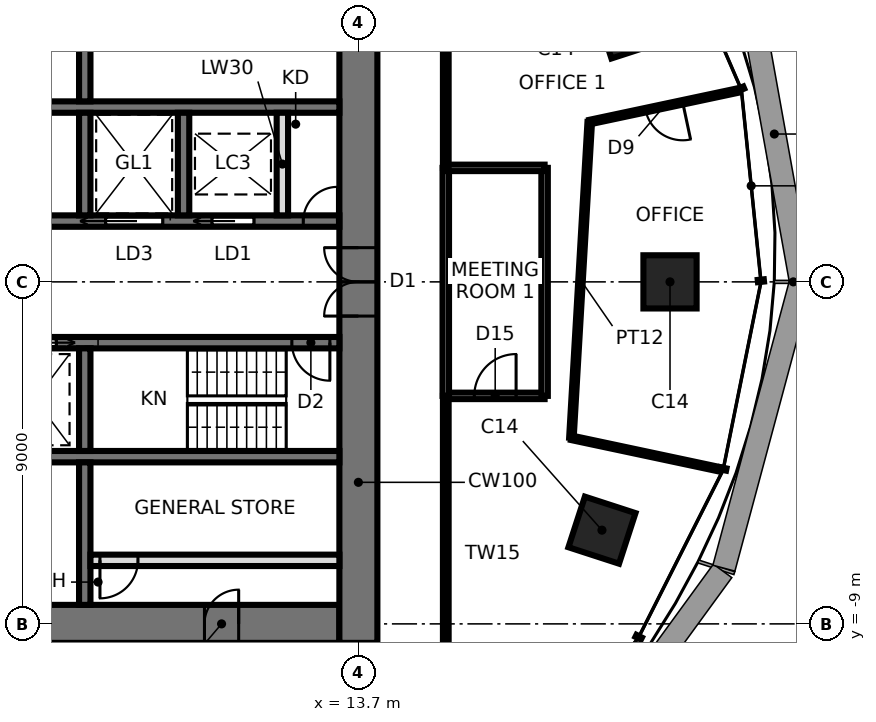
"""IFC4 building model, lengths in metres.
Left out: names, types, materials, properties, quantities, classifications, styles, units other than length and angle.
Written with IfcOpenShell. Run it as: python <this file> out.ifc"""

import sys

from ifc_helpers import new_model, si_unit, direction, frame, frame_2d, origin, origin_2d, place, context, subcontext, project, spatial, rectangle, extrude, element, fill, save


model = new_model("IFC4")
c1 = context("Model", 3, precision=1e-05, world=origin(), true_north=direction((0.0, 1.0)))
c2 = subcontext(c1, "Body", "Model", "MODEL_VIEW")
j1 = project(units=[si_unit("LENGTHUNIT", "METRE"), si_unit("PLANEANGLEUNIT", "RADIAN")], contexts=[c1])
p1 = place(None, origin())
s1 = spatial("IfcSite", under=j1, at=p1, CompositionType="ELEMENT")
p2 = place(p1, origin())
s2 = spatial("IfcBuilding", under=s1, at=p2, CompositionType="ELEMENT")
p3 = place(p2, frame((0.0, 0.0, 195.5)))
s3 = spatial("IfcBuildingStorey", under=s2, at=p3, CompositionType="ELEMENT", Elevation=195.5)
for number, where, z_axis, x_axis in (
    (1, (21.9, 0.0, 0.0), (0.0, 0.0, 1.0), (1.0, 0.0, 0.0)),
    (2, (20.808, 6.761, 0.0), (0.0, 0.0, 1.0), (0.951, 0.309, 0.0)),
    (3, (20.109, -6.534, 0.0), (0.0, 0.0, 1.0), (0.951, -0.309, 0.0)),
):
    element("IfcColumn", number, at=place(p3, frame(where, z_axis=z_axis, x_axis=x_axis)), inside=s3, PredefinedType="COLUMN", context=c2, shape_type="SweptSolid", body=[
        extrude(rectangle(XDim=1.4, YDim=1.4, at=origin_2d()), origin(), (0.0, 0.0, 1.0), 3.9),
    ])
p4 = place(p3, frame((-13.2, -9.0, 0.0), z_axis=(0.0, 0.0, 1.0), x_axis=(1.0, 0.0, 0.0)))
e4 = element("IfcWall", 4, at=p4, inside=s3, PredefinedType="SHEAR", context=c2, shape_type="SweptSolid", body=[
    extrude(rectangle(XDim=26.4, YDim=1.0, at=frame_2d((13.2, 0.0))), origin(), (0.0, 0.0, 1.0), 3.9),
])
p5 = place(p4, frame((2.65, 0.0, 0.0)))
e5 = element("IfcOpeningElement", 5, at=p5, cuts=e4, PredefinedType="OPENING", context=c2, shape_type="SweptSolid", body=[
    extrude(rectangle(XDim=0.9, YDim=2.1, at=frame_2d((0.45, 1.05))), frame((0.0, 0.51, 0.0), z_axis=(0.0, -1.0, 0.0), x_axis=(1.0, 0.0, 0.0)), (0.0, 0.0, 1.0), 1.02),
])
p6 = place(p4, frame((9.5, 0.0, 0.0)))
e6 = element("IfcOpeningElement", 6, at=p6, cuts=e4, PredefinedType="OPENING", context=c2, shape_type="SweptSolid", body=[
    extrude(rectangle(XDim=0.9, YDim=2.1, at=frame_2d((0.45, 1.05))), frame((0.0, 0.51, 0.0), z_axis=(0.0, -1.0, 0.0), x_axis=(1.0, 0.0, 0.0)), (0.0, 0.0, 1.0), 1.02),
])
p7 = place(p4, frame((16.0, 0.0, 0.0)))
e7 = element("IfcOpeningElement", 7, at=p7, cuts=e4, PredefinedType="OPENING", context=c2, shape_type="SweptSolid", body=[
    extrude(rectangle(XDim=0.9, YDim=2.1, at=frame_2d((0.45, 1.05))), frame((0.0, 0.51, 0.0), z_axis=(0.0, -1.0, 0.0), x_axis=(1.0, 0.0, 0.0)), (0.0, 0.0, 1.0), 1.02),
])
p8 = place(p4, frame((22.85, 0.0, 0.0)))
e8 = element("IfcOpeningElement", 8, at=p8, cuts=e4, PredefinedType="OPENING", context=c2, shape_type="SweptSolid", body=[
    extrude(rectangle(XDim=0.9, YDim=2.1, at=frame_2d((0.45, 1.05))), frame((0.0, 0.51, 0.0), z_axis=(0.0, -1.0, 0.0), x_axis=(1.0, 0.0, 0.0)), (0.0, 0.0, 1.0), 1.02),
])
p9 = place(p3, frame((13.7, -9.5, 0.0), z_axis=(0.0, 0.0, 1.0), x_axis=(0.0, 1.0, 0.0)))
e9 = element("IfcWall", 9, at=p9, inside=s3, PredefinedType="SHEAR", context=c2, shape_type="SweptSolid", body=[
    extrude(rectangle(XDim=19.0, YDim=1.0, at=frame_2d((9.5, 0.0))), origin(), (0.0, 0.0, 1.0), 3.9),
])
p10 = place(p9, frame((8.6, 0.0, 0.0)))
e10 = element("IfcOpeningElement", 10, at=p10, cuts=e9, PredefinedType="OPENING", context=c2, shape_type="SweptSolid", body=[
    extrude(rectangle(XDim=1.8, YDim=2.4, at=frame_2d((0.9, 1.2))), frame((0.0, 0.51, 0.0), z_axis=(0.0, -1.0, 0.0), x_axis=(1.0, 0.0, 0.0)), (0.0, 0.0, 1.0), 1.02),
])
p11 = place(p3, frame((-13.2, 1.6, 0.0), z_axis=(0.0, 0.0, 1.0), x_axis=(1.0, 0.0, 0.0)))
e11 = element("IfcWall", 11, at=p11, inside=s3, PredefinedType="SHEAR", context=c2, shape_type="SweptSolid", body=[
    extrude(rectangle(XDim=26.4, YDim=0.3, at=frame_2d((13.2, 0.0))), origin(), (0.0, 0.0, 1.0), 3.9),
])
p12 = place(p11, frame((0.25, 0.0, 0.0)))
e12 = element("IfcOpeningElement", 12, at=p12, cuts=e11, PredefinedType="OPENING", context=c2, shape_type="SweptSolid", body=[
    extrude(rectangle(XDim=1.0, YDim=2.1, at=frame_2d((0.5, 1.05))), frame((0.0, 0.16, 0.0), z_axis=(0.0, -1.0, 0.0), x_axis=(1.0, 0.0, 0.0)), (0.0, 0.0, 1.0), 0.32),
])
p13 = place(p11, frame((23.05, 0.0, 0.0)))
e13 = element("IfcOpeningElement", 13, at=p13, cuts=e11, PredefinedType="OPENING", context=c2, shape_type="SweptSolid", body=[
    extrude(rectangle(XDim=1.1, YDim=2.3, at=frame_2d((0.55, 1.15))), frame((0.0, 0.16, 0.0), z_axis=(0.0, -1.0, 0.0), x_axis=(1.0, 0.0, 0.0)), (0.0, 0.0, 1.0), 0.32),
])
p14 = place(p11, frame((20.25, 0.0, 0.0)))
e14 = element("IfcOpeningElement", 14, at=p14, cuts=e11, PredefinedType="OPENING", context=c2, shape_type="SweptSolid", body=[
    extrude(rectangle(XDim=1.5, YDim=2.4, at=frame_2d((0.75, 1.2))), frame((0.0, 0.16, 0.0), z_axis=(0.0, -1.0, 0.0), x_axis=(1.0, 0.0, 0.0)), (0.0, 0.0, 1.0), 0.32),
])
p15 = place(p11, frame((7.55, 0.0, 0.0)))
e15 = element("IfcOpeningElement", 15, at=p15, cuts=e11, PredefinedType="OPENING", context=c2, shape_type="SweptSolid", body=[
    extrude(rectangle(XDim=0.9, YDim=2.1, at=frame_2d((0.45, 1.05))), frame((0.0, 0.16, 0.0), z_axis=(0.0, -1.0, 0.0), x_axis=(1.0, 0.0, 0.0)), (0.0, 0.0, 1.0), 0.32),
])
p16 = place(p11, frame((10.15, 0.0, 0.0)))
e16 = element("IfcOpeningElement", 16, at=p16, cuts=e11, PredefinedType="OPENING", context=c2, shape_type="SweptSolid", body=[
    extrude(rectangle(XDim=0.9, YDim=2.1, at=frame_2d((0.45, 1.05))), frame((0.0, 0.16, 0.0), z_axis=(0.0, -1.0, 0.0), x_axis=(1.0, 0.0, 0.0)), (0.0, 0.0, 1.0), 0.32),
])
p17 = place(p11, frame((12.75, 0.0, 0.0)))
e17 = element("IfcOpeningElement", 17, at=p17, cuts=e11, PredefinedType="OPENING", context=c2, shape_type="SweptSolid", body=[
    extrude(rectangle(XDim=0.9, YDim=2.1, at=frame_2d((0.45, 1.05))), frame((0.0, 0.16, 0.0), z_axis=(0.0, -1.0, 0.0), x_axis=(1.0, 0.0, 0.0)), (0.0, 0.0, 1.0), 0.32),
])
p18 = place(p11, frame((25.45, 0.0, 0.0)))
e18 = element("IfcOpeningElement", 18, at=p18, cuts=e11, PredefinedType="OPENING", context=c2, shape_type="SweptSolid", body=[
    extrude(rectangle(XDim=0.9, YDim=2.1, at=frame_2d((0.45, 1.05))), frame((0.0, 0.16, 0.0), z_axis=(0.0, -1.0, 0.0), x_axis=(1.0, 0.0, 0.0)), (0.0, 0.0, 1.0), 0.32),
])
p19 = place(p3, frame((-13.2, -1.6, 0.0), z_axis=(0.0, 0.0, 1.0), x_axis=(1.0, 0.0, 0.0)))
e19 = element("IfcWall", 19, at=p19, inside=s3, PredefinedType="SHEAR", context=c2, shape_type="SweptSolid", body=[
    extrude(rectangle(XDim=26.4, YDim=0.3, at=frame_2d((13.2, 0.0))), origin(), (0.0, 0.0, 1.0), 3.9),
])
p20 = place(p19, frame((25.15, 0.0, 0.0)))
e20 = element("IfcOpeningElement", 20, at=p20, cuts=e19, PredefinedType="OPENING", context=c2, shape_type="SweptSolid", body=[
    extrude(rectangle(XDim=1.0, YDim=2.1, at=frame_2d((0.5, 1.05))), frame((0.0, 0.16, 0.0), z_axis=(0.0, -1.0, 0.0), x_axis=(1.0, 0.0, 0.0)), (0.0, 0.0, 1.0), 0.32),
])
p21 = place(p19, frame((7.55, 0.0, 0.0)))
e21 = element("IfcOpeningElement", 21, at=p21, cuts=e19, PredefinedType="OPENING", context=c2, shape_type="SweptSolid", body=[
    extrude(rectangle(XDim=0.9, YDim=2.1, at=frame_2d((0.45, 1.05))), frame((0.0, 0.16, 0.0), z_axis=(0.0, -1.0, 0.0), x_axis=(1.0, 0.0, 0.0)), (0.0, 0.0, 1.0), 0.32),
])
p22 = place(p19, frame((10.15, 0.0, 0.0)))
e22 = element("IfcOpeningElement", 22, at=p22, cuts=e19, PredefinedType="OPENING", context=c2, shape_type="SweptSolid", body=[
    extrude(rectangle(XDim=0.9, YDim=2.1, at=frame_2d((0.45, 1.05))), frame((0.0, 0.16, 0.0), z_axis=(0.0, -1.0, 0.0), x_axis=(1.0, 0.0, 0.0)), (0.0, 0.0, 1.0), 0.32),
])
p23 = place(p19, frame((12.75, 0.0, 0.0)))
e23 = element("IfcOpeningElement", 23, at=p23, cuts=e19, PredefinedType="OPENING", context=c2, shape_type="SweptSolid", body=[
    extrude(rectangle(XDim=0.9, YDim=2.1, at=frame_2d((0.45, 1.05))), frame((0.0, 0.16, 0.0), z_axis=(0.0, -1.0, 0.0), x_axis=(1.0, 0.0, 0.0)), (0.0, 0.0, 1.0), 0.32),
])
p24 = place(p19, frame((15.25, 0.0, 0.0)))
e24 = element("IfcOpeningElement", 24, at=p24, cuts=e19, PredefinedType="OPENING", context=c2, shape_type="SweptSolid", body=[
    extrude(rectangle(XDim=1.1, YDim=2.3, at=frame_2d((0.55, 1.15))), frame((0.0, 0.16, 0.0), z_axis=(0.0, -1.0, 0.0), x_axis=(1.0, 0.0, 0.0)), (0.0, 0.0, 1.0), 0.32),
])
p25 = place(p19, frame((17.85, 0.0, 0.0)))
e25 = element("IfcOpeningElement", 25, at=p25, cuts=e19, PredefinedType="OPENING", context=c2, shape_type="SweptSolid", body=[
    extrude(rectangle(XDim=1.1, YDim=2.3, at=frame_2d((0.55, 1.15))), frame((0.0, 0.16, 0.0), z_axis=(0.0, -1.0, 0.0), x_axis=(1.0, 0.0, 0.0)), (0.0, 0.0, 1.0), 0.32),
])
p26 = place(p19, frame((4.85, 0.0, 0.0)))
e26 = element("IfcOpeningElement", 26, at=p26, cuts=e19, PredefinedType="OPENING", context=c2, shape_type="SweptSolid", body=[
    extrude(rectangle(XDim=1.1, YDim=2.3, at=frame_2d((0.55, 1.15))), frame((0.0, 0.16, 0.0), z_axis=(0.0, -1.0, 0.0), x_axis=(1.0, 0.0, 0.0)), (0.0, 0.0, 1.0), 0.32),
])
p27 = place(p19, frame((2.25, 0.0, 0.0)))
e27 = element("IfcOpeningElement", 27, at=p27, cuts=e19, PredefinedType="OPENING", context=c2, shape_type="SweptSolid", body=[
    extrude(rectangle(XDim=1.1, YDim=2.3, at=frame_2d((0.55, 1.15))), frame((0.0, 0.16, 0.0), z_axis=(0.0, -1.0, 0.0), x_axis=(1.0, 0.0, 0.0)), (0.0, 0.0, 1.0), 0.32),
])
p28 = place(p19, frame((0.35, 0.0, 0.0)))
e28 = element("IfcOpeningElement", 28, at=p28, cuts=e19, PredefinedType="OPENING", context=c2, shape_type="SweptSolid", body=[
    extrude(rectangle(XDim=0.9, YDim=2.1, at=frame_2d((0.45, 1.05))), frame((0.0, 0.16, 0.0), z_axis=(0.0, -1.0, 0.0), x_axis=(1.0, 0.0, 0.0)), (0.0, 0.0, 1.0), 0.32),
])
for number, where, z_axis, x_axis in (
    (29, (-13.2, 4.6, 0.0), (0.0, 0.0, 1.0), (1.0, 0.0, 0.0)),
    (30, (-13.2, -4.6, 0.0), (0.0, 0.0, 1.0), (1.0, 0.0, 0.0)),
):
    element("IfcWall", number, at=place(p3, frame(where, z_axis=z_axis, x_axis=x_axis)), inside=s3, PredefinedType="SHEAR", context=c2, shape_type="SweptSolid", body=[
        extrude(rectangle(XDim=26.4, YDim=0.3, at=frame_2d((13.2, 0.0))), origin(), (0.0, 0.0, 1.0), 3.9),
    ])
p29 = place(p3, frame((6.5, 1.75, 0.0), z_axis=(0.0, 0.0, 1.0), x_axis=(0.0, 1.0, 0.0)))
e31 = element("IfcWall", 31, at=p29, inside=s3, PredefinedType="SHEAR", context=c2, shape_type="SweptSolid", body=[
    extrude(rectangle(XDim=2.7, YDim=0.3, at=frame_2d((1.35, 0.0))), origin(), (0.0, 0.0, 1.0), 3.9),
])
p30 = place(p3, frame((6.5, 4.75, 0.0), z_axis=(0.0, 0.0, 1.0), x_axis=(0.0, 1.0, 0.0)))
e32 = element("IfcWall", 32, at=p30, inside=s3, PredefinedType="SHEAR", context=c2, shape_type="SweptSolid", body=[
    extrude(rectangle(XDim=3.75, YDim=0.3, at=frame_2d((1.875, 0.0))), origin(), (0.0, 0.0, 1.0), 3.9),
])
p31 = place(p3, frame((6.5, -1.75, 0.0), z_axis=(0.0, 0.0, 1.0), x_axis=(0.0, -1.0, 0.0)))
e33 = element("IfcWall", 33, at=p31, inside=s3, PredefinedType="SHEAR", context=c2, shape_type="SweptSolid", body=[
    extrude(rectangle(XDim=2.7, YDim=0.3, at=frame_2d((1.35, 0.0))), origin(), (0.0, 0.0, 1.0), 3.9),
])
p32 = place(p3, frame((6.5, -4.75, 0.0), z_axis=(0.0, 0.0, 1.0), x_axis=(0.0, -1.0, 0.0)))
e34 = element("IfcWall", 34, at=p32, inside=s3, PredefinedType="SHEAR", context=c2, shape_type="SweptSolid", body=[
    extrude(rectangle(XDim=3.75, YDim=0.3, at=frame_2d((1.875, 0.0))), origin(), (0.0, 0.0, 1.0), 3.9),
])
p33 = place(p3, frame((9.1, 1.75, 0.0), z_axis=(0.0, 0.0, 1.0), x_axis=(0.0, 1.0, 0.0)))
e35 = element("IfcWall", 35, at=p33, inside=s3, PredefinedType="SHEAR", context=c2, shape_type="SweptSolid", body=[
    extrude(rectangle(XDim=2.7, YDim=0.3, at=frame_2d((1.35, 0.0))), origin(), (0.0, 0.0, 1.0), 3.9),
])
p34 = place(p3, frame((6.65, -7.328, 0.0), z_axis=(0.0, 0.0, 1.0), x_axis=(1.0, 0.0, 0.0)))
e36 = element("IfcWall", 36, at=p34, inside=s3, PredefinedType="PARTITIONING", context=c2, shape_type="SweptSolid", body=[
    extrude(rectangle(XDim=6.55, YDim=0.3, at=frame_2d((3.275, 0.0))), origin(), (0.0, 0.0, 1.0), 3.74),
])
p35 = place(p34, frame((0.25, 0.0, 0.0)))
e37 = element("IfcOpeningElement", 37, at=p35, cuts=e36, PredefinedType="OPENING", context=c2, shape_type="SweptSolid", body=[
    extrude(rectangle(XDim=1.0, YDim=2.4, at=frame_2d((0.5, 1.2))), frame((0.0, 0.16, 0.0), z_axis=(0.0, -1.0, 0.0), x_axis=(1.0, 0.0, 0.0)), (0.0, 0.0, 1.0), 0.32),
])
p36 = place(p3, frame((11.7, 1.75, 0.0), z_axis=(0.0, 0.0, 1.0), x_axis=(0.0, 1.0, 0.0)))
e38 = element("IfcWall", 38, at=p36, inside=s3, PredefinedType="SOLIDWALL", context=c2, shape_type="SweptSolid", body=[
    extrude(rectangle(XDim=2.7, YDim=0.3, at=frame_2d((1.35, 0.0))), origin(), (0.0, 0.0, 1.0), 3.74),
])
p37 = place(p3, frame((16.0, -11.3, 0.0), z_axis=(0.0, 0.0, 1.0), x_axis=(0.0, 1.0, 0.0)))
e39 = element("IfcWall", 39, at=p37, inside=s3, PredefinedType="PARTITIONING", context=c2, shape_type="SweptSolid", body=[
    extrude(rectangle(XDim=8.3, YDim=0.15, at=frame_2d((4.15, 0.0))), origin(), (0.0, 0.0, 1.0), 3.74),
])
p38 = place(p3, frame((19.306, -4.104, 0.0), z_axis=(0.0, 0.0, 1.0), x_axis=(0.978137903693, -0.207957306576, 0.0)))
e40 = element("IfcWall", 40, at=p38, inside=s3, PredefinedType="PARTITIONING", context=c2, shape_type="SweptSolid", body=[
    extrude(rectangle(XDim=4.0, YDim=0.12, at=frame_2d((2.0, 0.0))), origin(), (0.0, 0.0, 1.0), 3.74),
])
p39 = place(p3, frame((16.0, -3.0, 0.0), z_axis=(0.0, 0.0, 1.0), x_axis=(1.0, 0.0, 0.0)))
e41 = element("IfcWall", 41, at=p39, inside=s3, PredefinedType="PARTITIONING", context=c2, shape_type="SweptSolid", body=[
    extrude(rectangle(XDim=2.6, YDim=0.17, at=frame_2d((1.3, 0.0))), origin(), (0.0, 0.0, 1.0), 3.74),
])
p40 = place(p39, frame((0.75, 0.0, 0.0)))
e42 = element("IfcOpeningElement", 42, at=p40, cuts=e41, PredefinedType="OPENING", context=c2, shape_type="SweptSolid", body=[
    extrude(rectangle(XDim=1.1, YDim=2.4, at=frame_2d((0.55, 1.2))), frame((0.0, 0.095, 0.0), z_axis=(0.0, -1.0, 0.0), x_axis=(1.0, 0.0, 0.0)), (0.0, 0.0, 1.0), 0.19),
])
for number, where, z_axis, x_axis in (
    (43, (16.0, 3.0, 0.0), (0.0, 0.0, 1.0), (0.0, -1.0, 0.0)),
    (44, (18.6, -3.0, 0.0), (0.0, 0.0, 1.0), (0.0, 1.0, 0.0)),
):
    element("IfcWall", number, at=place(p3, frame(where, z_axis=z_axis, x_axis=x_axis)), inside=s3, PredefinedType="PARTITIONING", context=c2, shape_type="SweptSolid", body=[
        extrude(rectangle(XDim=6.0, YDim=0.17, at=frame_2d((3.0, 0.0))), origin(), (0.0, 0.0, 1.0), 3.74),
    ])
p41 = place(p3, frame((19.788, 4.206, 0.0), z_axis=(0.0, 0.0, 1.0), x_axis=(-0.0579293499, -0.998320685161, 0.0)))
e45 = element("IfcWall", 45, at=p41, inside=s3, PredefinedType="PARTITIONING", context=c2, shape_type="SweptSolid", body=[
    extrude(rectangle(XDim=8.323, YDim=0.12, at=frame_2d((4.162, 0.0))), origin(), (0.0, 0.0, 1.0), 3.74),
])
p42 = place(p3, frame((18.6, 3.0, 0.0), z_axis=(0.0, 0.0, 1.0), x_axis=(-1.0, 0.0, 0.0)))
e46 = element("IfcWall", 46, at=p42, inside=s3, PredefinedType="PARTITIONING", context=c2, shape_type="SweptSolid", body=[
    extrude(rectangle(XDim=2.6, YDim=0.17, at=frame_2d((1.3, 0.0))), origin(), (0.0, 0.0, 1.0), 3.74),
])
p43 = place(p3, frame((23.7, 5.038, 0.0), z_axis=(0.0, 0.0, 1.0), x_axis=(-0.978152955943, -0.207886494942, 0.0)))
e47 = element("IfcWall", 47, at=p43, inside=s3, PredefinedType="PARTITIONING", context=c2, shape_type="SweptSolid", body=[
    extrude(rectangle(XDim=4.0, YDim=0.12, at=frame_2d((2.0, 0.0))), origin(), (0.0, 0.0, 1.0), 3.74),
])
p44 = place(p43, frame((1.5, 0.0, 0.0)))
e48 = element("IfcOpeningElement", 48, at=p44, cuts=e47, PredefinedType="OPENING", context=c2, shape_type="SweptSolid", body=[
    extrude(rectangle(XDim=1.0, YDim=2.4, at=frame_2d((0.5, 1.2))), frame((0.0, 0.07, 0.0), z_axis=(0.0, -1.0, 0.0), x_axis=(1.0, 0.0, 0.0)), (0.0, 0.0, 1.0), 0.14),
])
p45 = place(p3, frame((16.0, 3.0, 0.0), z_axis=(0.0, 0.0, 1.0), x_axis=(0.0, 1.0, 0.0)))
e49 = element("IfcWall", 49, at=p45, inside=s3, PredefinedType="PARTITIONING", context=c2, shape_type="SweptSolid", body=[
    extrude(rectangle(XDim=8.3, YDim=0.15, at=frame_2d((4.15, 0.0))), origin(), (0.0, 0.0, 1.0), 3.74),
])
p46 = place(p10, origin())
e50 = element("IfcDoor", 50, at=p46, inside=s3, OperationType="DOUBLE_DOOR_SINGLE_SWING", PredefinedType="DOOR", context=c2, shape_type="SweptSolid", body=[
    extrude(rectangle(XDim=1.72, YDim=2.36, at=frame_2d((0.9, 1.18))), frame((0.0, 0.025, 0.0), z_axis=(0.0, -1.0, 0.0), x_axis=(1.0, 0.0, 0.0)), (0.0, 0.0, 1.0), 0.05),
    extrude(rectangle(XDim=0.04, YDim=2.4, at=frame_2d((0.02, 1.2))), frame((0.0, 0.25, 0.0), z_axis=(0.0, -1.0, 0.0), x_axis=(1.0, 0.0, 0.0)), (0.0, 0.0, 1.0), 0.5),
    extrude(rectangle(XDim=0.04, YDim=2.4, at=frame_2d((1.78, 1.2))), frame((0.0, 0.25, 0.0), z_axis=(0.0, -1.0, 0.0), x_axis=(1.0, 0.0, 0.0)), (0.0, 0.0, 1.0), 0.5),
    extrude(rectangle(XDim=1.72, YDim=0.04, at=frame_2d((0.9, 2.38))), frame((0.0, 0.25, 0.0), z_axis=(0.0, -1.0, 0.0), x_axis=(1.0, 0.0, 0.0)), (0.0, 0.0, 1.0), 0.5),
])
fill(e10, e50)
p47 = place(p20, frame((1.0, 0.0, 0.0), z_axis=(0.0, 0.0, 1.0), x_axis=(-1.0, 0.0, 0.0)))
e51 = element("IfcDoor", 51, at=p47, inside=s3, OperationType="SINGLE_SWING_LEFT", PredefinedType="DOOR", context=c2, shape_type="SweptSolid", body=[
    extrude(rectangle(XDim=1.0, YDim=2.1, at=frame_2d((0.5, 1.05))), frame((0.0, 0.025, 0.0), z_axis=(0.0, -1.0, 0.0), x_axis=(1.0, 0.0, 0.0)), (0.0, 0.0, 1.0), 0.05),
])
fill(e20, e51)
p48 = place(p13, origin())
e52 = element("IfcDoor", 52, at=p48, inside=s3, OperationType="SLIDING_TO_LEFT", PredefinedType="DOOR", context=c2, shape_type="SweptSolid", body=[
    extrude(rectangle(XDim=1.1, YDim=2.3, at=frame_2d((0.55, 1.15))), frame((0.0, 0.025, 0.0), z_axis=(0.0, -1.0, 0.0), x_axis=(1.0, 0.0, 0.0)), (0.0, 0.0, 1.0), 0.05),
])
fill(e13, e52)
p49 = place(p14, origin())
e53 = element("IfcDoor", 53, at=p49, inside=s3, OperationType="SLIDING_TO_LEFT", PredefinedType="DOOR", context=c2, shape_type="SweptSolid", body=[
    extrude(rectangle(XDim=1.5, YDim=2.4, at=frame_2d((0.75, 1.2))), frame((0.0, 0.025, 0.0), z_axis=(0.0, -1.0, 0.0), x_axis=(1.0, 0.0, 0.0)), (0.0, 0.0, 1.0), 0.05),
])
fill(e14, e53)
p50 = place(p25, frame((1.1, 0.0, 0.0), z_axis=(0.0, 0.0, 1.0), x_axis=(-1.0, 0.0, 0.0)))
e54 = element("IfcDoor", 54, at=p50, inside=s3, OperationType="SLIDING_TO_LEFT", PredefinedType="DOOR", context=c2, shape_type="SweptSolid", body=[
    extrude(rectangle(XDim=1.1, YDim=2.3, at=frame_2d((0.55, 1.15))), frame((0.0, 0.025, 0.0), z_axis=(0.0, -1.0, 0.0), x_axis=(1.0, 0.0, 0.0)), (0.0, 0.0, 1.0), 0.05),
])
fill(e25, e54)
p51 = place(p18, origin())
e55 = element("IfcDoor", 55, at=p51, inside=s3, OperationType="SINGLE_SWING_RIGHT", PredefinedType="DOOR", context=c2, shape_type="SweptSolid", body=[
    extrude(rectangle(XDim=0.9, YDim=2.1, at=frame_2d((0.45, 1.05))), frame((0.0, 0.025, 0.0), z_axis=(0.0, -1.0, 0.0), x_axis=(1.0, 0.0, 0.0)), (0.0, 0.0, 1.0), 0.05),
])
fill(e18, e55)
p52 = place(p8, origin())
e56 = element("IfcDoor", 56, at=p52, inside=s3, OperationType="SINGLE_SWING_RIGHT", PredefinedType="DOOR", context=c2, shape_type="SweptSolid", body=[
    extrude(rectangle(XDim=0.82, YDim=2.06, at=frame_2d((0.45, 1.03))), frame((0.0, 0.025, 0.0), z_axis=(0.0, -1.0, 0.0), x_axis=(1.0, 0.0, 0.0)), (0.0, 0.0, 1.0), 0.05),
    extrude(rectangle(XDim=0.04, YDim=2.1, at=frame_2d((0.02, 1.05))), frame((0.0, 0.25, 0.0), z_axis=(0.0, -1.0, 0.0), x_axis=(1.0, 0.0, 0.0)), (0.0, 0.0, 1.0), 0.5),
    extrude(rectangle(XDim=0.04, YDim=2.1, at=frame_2d((0.88, 1.05))), frame((0.0, 0.25, 0.0), z_axis=(0.0, -1.0, 0.0), x_axis=(1.0, 0.0, 0.0)), (0.0, 0.0, 1.0), 0.5),
    extrude(rectangle(XDim=0.82, YDim=0.04, at=frame_2d((0.45, 2.08))), frame((0.0, 0.25, 0.0), z_axis=(0.0, -1.0, 0.0), x_axis=(1.0, 0.0, 0.0)), (0.0, 0.0, 1.0), 0.5),
])
fill(e8, e56)
p53 = place(p35, frame((1.0, 0.0, 0.0), z_axis=(0.0, 0.0, 1.0), x_axis=(-1.0, 0.0, 0.0)))
e57 = element("IfcDoor", 57, at=p53, inside=s3, OperationType="SINGLE_SWING_RIGHT", PredefinedType="DOOR", context=c2, shape_type="SweptSolid", body=[
    extrude(rectangle(XDim=1.0, YDim=2.4, at=frame_2d((0.5, 1.2))), frame((0.0, 0.025, 0.0), z_axis=(0.0, -1.0, 0.0), x_axis=(1.0, 0.0, 0.0)), (0.0, 0.0, 1.0), 0.05),
])
fill(e37, e57)
p54 = place(p44, origin())
e58 = element("IfcDoor", 58, at=p54, inside=s3, OperationType="SINGLE_SWING_LEFT", PredefinedType="DOOR", context=c2, shape_type="SweptSolid", body=[
    extrude(rectangle(XDim=1.0, YDim=2.4, at=frame_2d((0.5, 1.2))), frame((0.0, 0.025, 0.0), z_axis=(0.0, -1.0, 0.0), x_axis=(1.0, 0.0, 0.0)), (0.0, 0.0, 1.0), 0.05),
])
fill(e48, e58)
p55 = place(p40, origin())
e59 = element("IfcDoor", 59, at=p55, inside=s3, OperationType="SINGLE_SWING_RIGHT", PredefinedType="DOOR", context=c2, shape_type="SweptSolid", body=[
    extrude(rectangle(XDim=1.1, YDim=2.4, at=frame_2d((0.55, 1.2))), frame((0.0, 0.025, 0.0), z_axis=(0.0, -1.0, 0.0), x_axis=(1.0, 0.0, 0.0)), (0.0, 0.0, 1.0), 0.05),
])
fill(e42, e59)
save(model, sys.argv[1])
